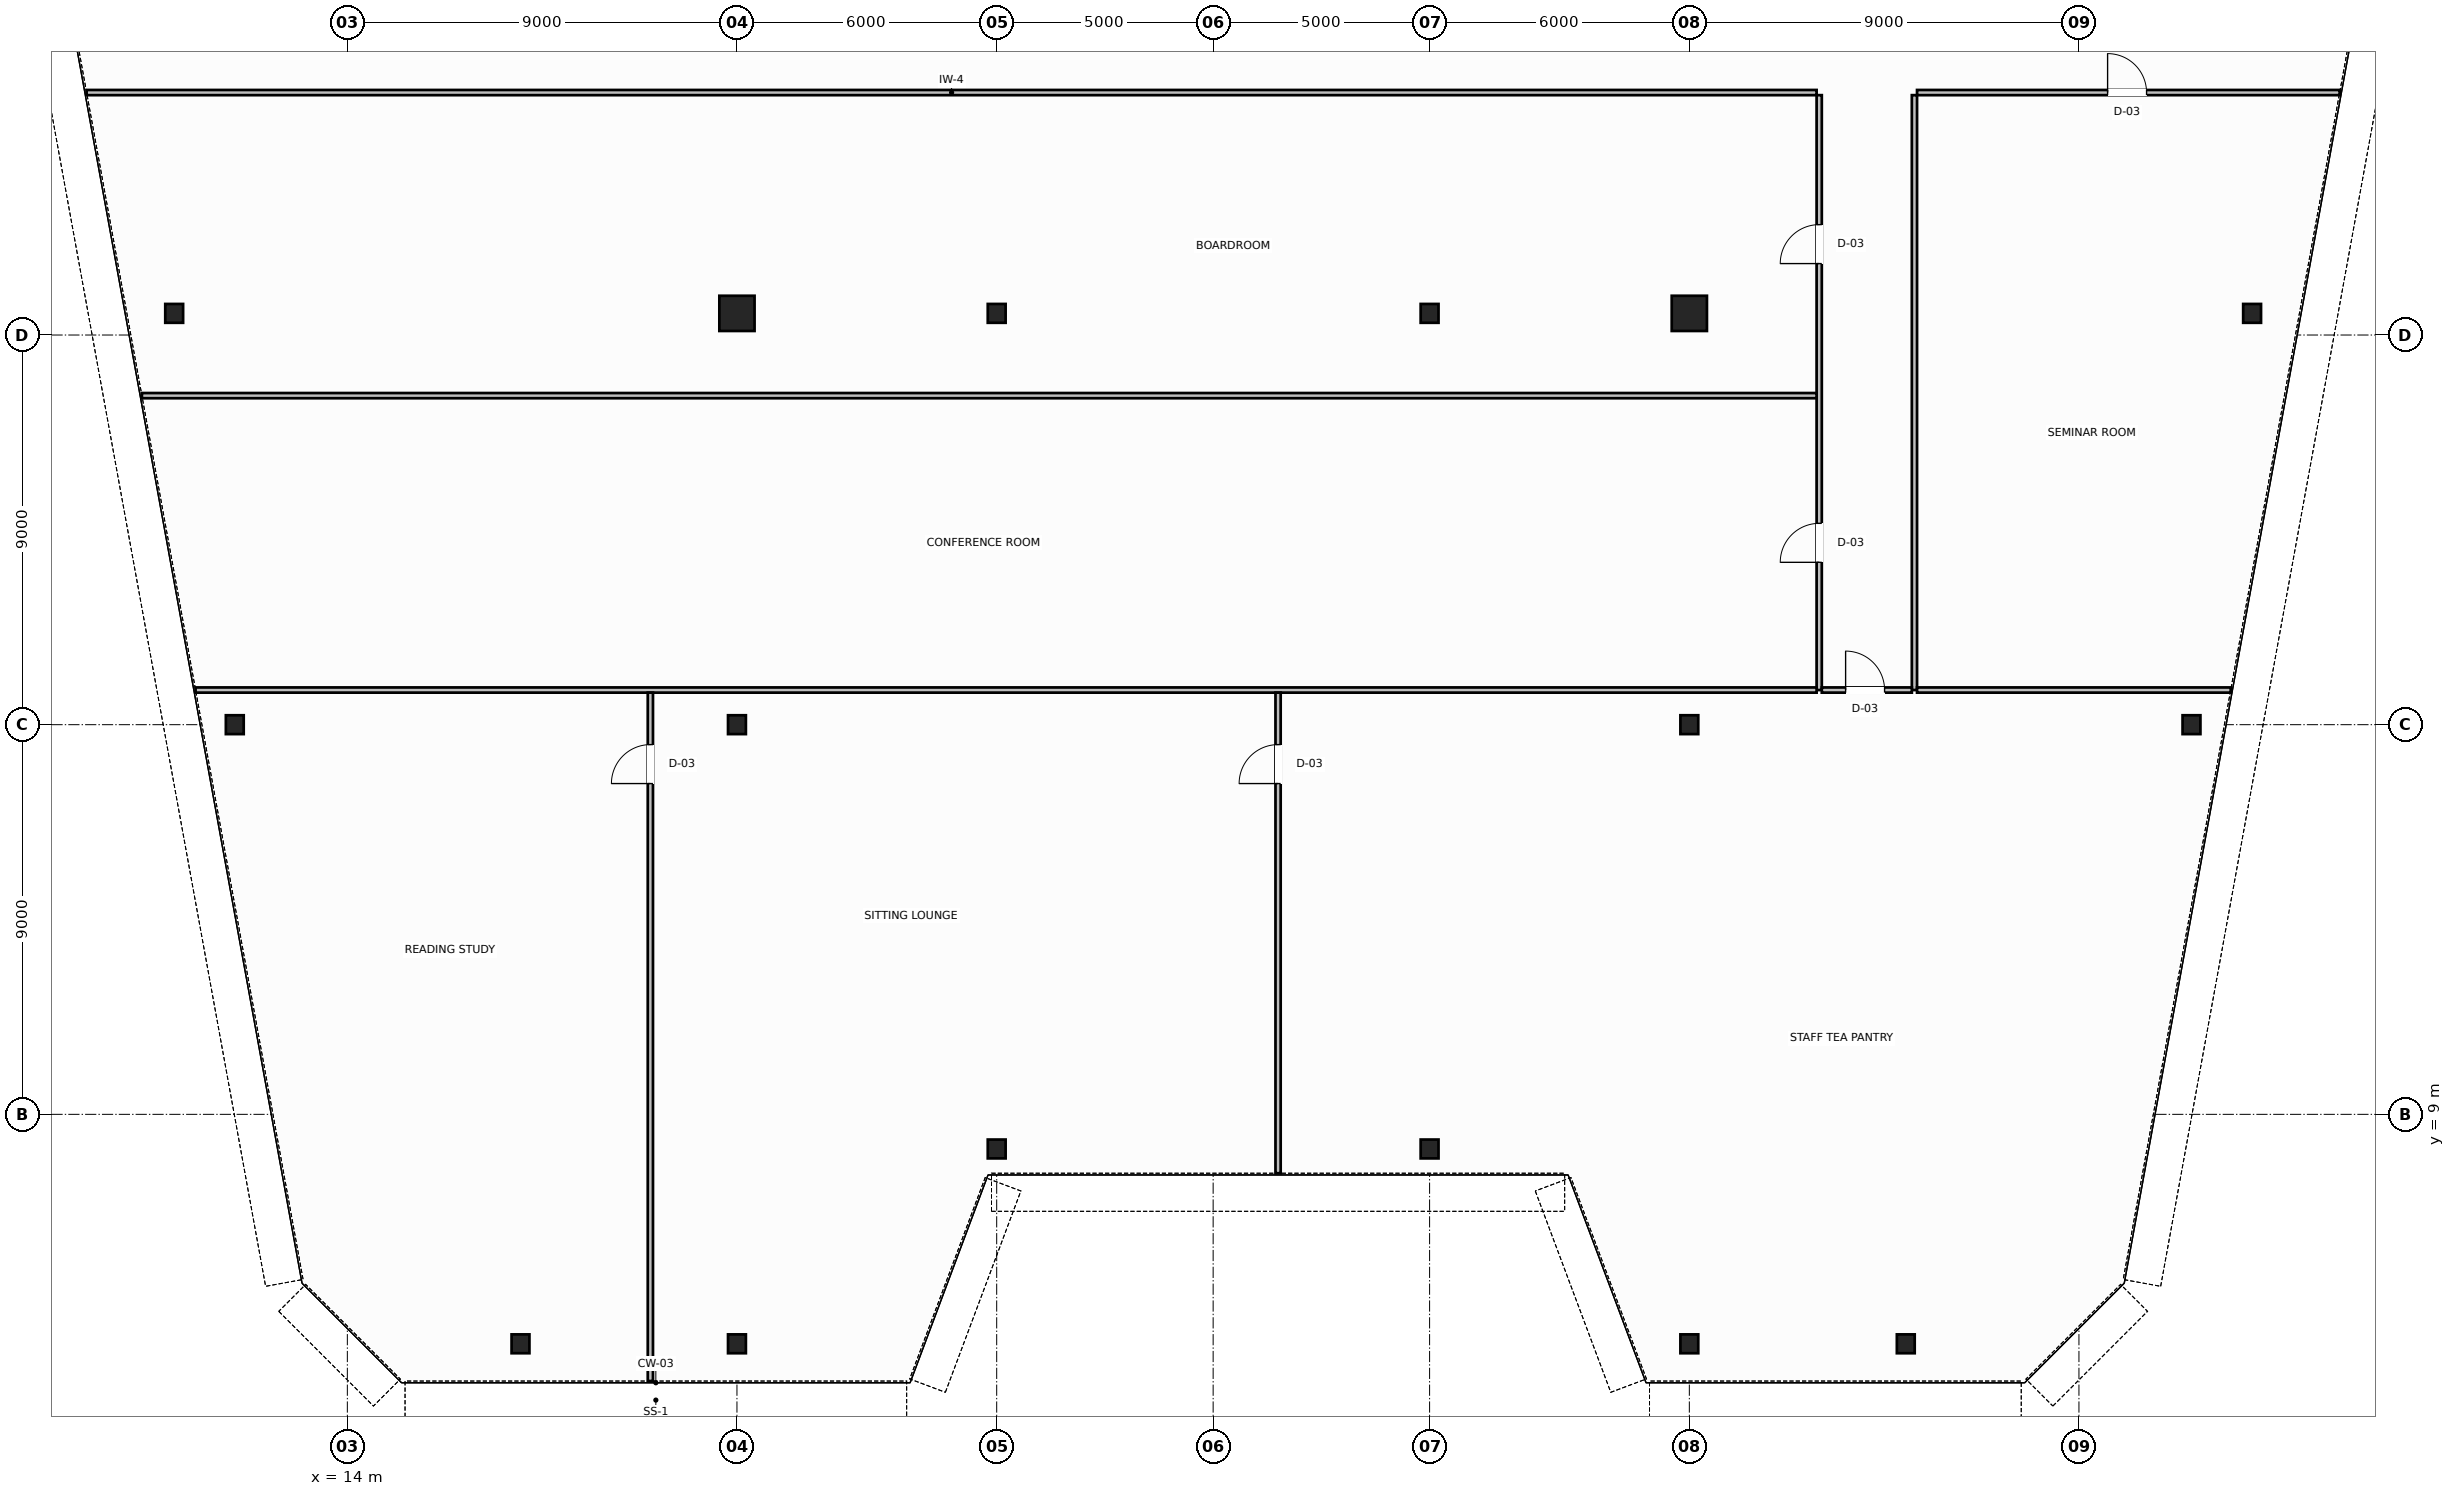
"""IFC4 building model, lengths in metres.
Left out: names, types, materials, properties, quantities, classifications, styles, units other than length and angle.
Written with IfcOpenShell. Run it as: python <this file> out.ifc"""

import sys

from ifc_helpers import new_model, si_unit, direction, frame, frame_2d, origin, origin_2d, place, context, subcontext, project, spatial, rectangle, hollow_circle, i_section, extrude, source, transform, mapped, element, fill, save


model = new_model("IFC4")
c1 = context("Model", 3, precision=1e-05, world=origin(), true_north=direction((0.0, 1.0)))
c2 = subcontext(c1, "Body", "Model", "MODEL_VIEW")
j1 = project(units=[si_unit("LENGTHUNIT", "METRE"), si_unit("PLANEANGLEUNIT", "RADIAN")], contexts=[c1])
p1 = place(None, origin())
s1 = spatial("IfcSite", under=j1, at=p1, CompositionType="ELEMENT")
p2 = place(p1, origin())
s2 = spatial("IfcBuilding", under=s1, at=p2, CompositionType="ELEMENT")
p3 = place(p2, frame((0.0, 0.0, 172.8)))
s3 = spatial("IfcBuildingStorey", under=s2, at=p3, CompositionType="ELEMENT", Elevation=172.8)
m1 = source(origin(), c2, "Body", "SweptSolid", [
    extrude(i_section(OverallWidth=0.412, OverallDepth=0.435, WebThickness=0.036, FlangeThickness=0.05, FilletRadius=0.015, at=origin_2d()), origin(), (0.0, 0.0, 1.0), 3.8),
])
for number, where, z_axis, x_axis in (
    (1, (10.0, 27.5, 0.0), (0.0, 0.0, 1.0), (1.0, 0.0, 0.0)),
    (2, (11.4, 18.0, 0.0), (0.0, 0.0, 1.0), (1.0, 0.0, 0.0)),
    (3, (58.0, 27.5, 0.0), (0.0, 0.0, 1.0), (1.0, 0.0, 0.0)),
    (4, (56.6, 18.0, 0.0), (0.0, 0.0, 1.0), (1.0, 0.0, 0.0)),
):
    element("IfcColumn", number, at=place(p3, frame(where, z_axis=z_axis, x_axis=x_axis)), inside=s3, PredefinedType="COLUMN", context=c2, shape_type="MappedRepresentation", body=[
        mapped(m1, transform((0.0, 0.0, 0.0), scale=1.0)),
    ])
m2 = source(origin(), c2, "Body", "SweptSolid", [
    extrude(hollow_circle(Radius=0.406, WallThickness=0.04, at=origin_2d()), origin(), (0.0, 0.0, 1.0), 3.8),
])
p4 = place(p3, frame((23.0, 27.5, 0.0), z_axis=(0.0, 0.0, 1.0), x_axis=(1.0, 0.0, 0.0)))
e5 = element("IfcColumn", 5, at=p4, inside=s3, PredefinedType="COLUMN", context=c2, shape_type="MappedRepresentation", body=[
    mapped(m2, transform((0.0, 0.0, 0.0), scale=1.0)),
])
m3 = source(origin(), c2, "Body", "SweptSolid", [
    extrude(i_section(OverallWidth=0.412, OverallDepth=0.435, WebThickness=0.036, FlangeThickness=0.05, FilletRadius=0.015, at=origin_2d()), origin(), (0.0, 0.0, 1.0), 3.8),
])
for number, where, z_axis, x_axis in (
    (6, (29.0, 27.5, 0.0), (0.0, 0.0, 1.0), (1.0, 0.0, 0.0)),
    (7, (39.0, 27.5, 0.0), (0.0, 0.0, 1.0), (1.0, 0.0, 0.0)),
):
    element("IfcColumn", number, at=place(p3, frame(where, z_axis=z_axis, x_axis=x_axis)), inside=s3, PredefinedType="COLUMN", context=c2, shape_type="MappedRepresentation", body=[
        mapped(m3, transform((0.0, 0.0, 0.0), scale=1.0)),
    ])
p5 = place(p3, frame((45.0, 27.5, 0.0), z_axis=(0.0, 0.0, 1.0), x_axis=(1.0, 0.0, 0.0)))
e8 = element("IfcColumn", 8, at=p5, inside=s3, PredefinedType="COLUMN", context=c2, shape_type="MappedRepresentation", body=[
    mapped(m2, transform((0.0, 0.0, 0.0), scale=1.0)),
])
for number, where, z_axis, x_axis in (
    (9, (23.0, 18.0, 0.0), (0.0, 0.0, 1.0), (1.0, 0.0, 0.0)),
    (10, (45.0, 18.0, 0.0), (0.0, 0.0, 1.0), (1.0, 0.0, 0.0)),
    (11, (18.0, 3.7, 0.0), (0.0, 0.0, 1.0), (1.0, 0.0, 0.0)),
    (12, (23.0, 3.7, 0.0), (0.0, 0.0, 1.0), (1.0, 0.0, 0.0)),
    (13, (29.0, 8.2, 0.0), (0.0, 0.0, 1.0), (1.0, 0.0, 0.0)),
    (14, (39.0, 8.2, 0.0), (0.0, 0.0, 1.0), (1.0, 0.0, 0.0)),
    (15, (45.0, 3.7, 0.0), (0.0, 0.0, 1.0), (1.0, 0.0, 0.0)),
    (16, (50.0, 3.7, 0.0), (0.0, 0.0, 1.0), (1.0, 0.0, 0.0)),
):
    element("IfcColumn", number, at=place(p3, frame(where, z_axis=z_axis, x_axis=x_axis)), inside=s3, PredefinedType="COLUMN", context=c2, shape_type="MappedRepresentation", body=[
        mapped(m3, transform((0.0, 0.0, 0.0), scale=1.0)),
    ])
p6 = place(p3, frame((7.977, 32.6, 0.0), z_axis=(0.0, 0.0, 1.0), x_axis=(1.0, 0.0, 0.0)))
e17 = element("IfcWall", 17, at=p6, inside=s3, PredefinedType="PARTITIONING", context=c2, shape_type="SweptSolid", body=[
    extrude(rectangle(XDim=39.963, YDim=0.12, at=frame_2d((19.981, 0.0))), origin(), (0.0, 0.0, 1.0), 3.58),
])
p7 = place(p3, frame((50.26, 32.6, 0.0), z_axis=(0.0, 0.0, 1.0), x_axis=(1.0, 0.0, 0.0)))
e18 = element("IfcWall", 18, at=p7, inside=s3, PredefinedType="PARTITIONING", context=c2, shape_type="SweptSolid", body=[
    extrude(rectangle(XDim=9.763, YDim=0.12, at=frame_2d((4.882, 0.0))), origin(), (0.0, 0.0, 1.0), 3.58),
])
p8 = place(p7, frame((4.402, 0.0, 0.0)))
e19 = element("IfcOpeningElement", 19, at=p8, cuts=e18, PredefinedType="OPENING", context=c2, shape_type="SweptSolid", body=[
    extrude(rectangle(XDim=0.9, YDim=2.15, at=frame_2d((0.45, 1.075))), frame((0.0, 0.07, 0.0), z_axis=(0.0, -1.0, 0.0), x_axis=(1.0, 0.0, 0.0)), (0.0, 0.0, 1.0), 0.14),
])
p9 = place(p3, frame((48.0, 18.8, 0.0), z_axis=(0.0, 0.0, 1.0), x_axis=(0.0, 1.0, 0.0)))
e20 = element("IfcWall", 20, at=p9, inside=s3, PredefinedType="PARTITIONING", context=c2, shape_type="SweptSolid", body=[
    extrude(rectangle(XDim=13.74, YDim=0.12, at=frame_2d((6.87, 0.0))), origin(), (0.0, 0.0, 1.0), 3.58),
])
p10 = place(p9, frame((2.95, 0.0, 0.0)))
e21 = element("IfcOpeningElement", 21, at=p10, cuts=e20, PredefinedType="OPENING", context=c2, shape_type="SweptSolid", body=[
    extrude(rectangle(XDim=0.9, YDim=2.15, at=frame_2d((0.45, 1.075))), frame((0.0, 0.07, 0.0), z_axis=(0.0, -1.0, 0.0), x_axis=(1.0, 0.0, 0.0)), (0.0, 0.0, 1.0), 0.14),
])
p11 = place(p9, frame((9.85, 0.0, 0.0)))
e22 = element("IfcOpeningElement", 22, at=p11, cuts=e20, PredefinedType="OPENING", context=c2, shape_type="SweptSolid", body=[
    extrude(rectangle(XDim=0.9, YDim=2.15, at=frame_2d((0.45, 1.075))), frame((0.0, 0.07, 0.0), z_axis=(0.0, -1.0, 0.0), x_axis=(1.0, 0.0, 0.0)), (0.0, 0.0, 1.0), 0.14),
])
p12 = place(p3, frame((50.2, 18.8, 0.0), z_axis=(0.0, 0.0, 1.0), x_axis=(0.0, 1.0, 0.0)))
e23 = element("IfcWall", 23, at=p12, inside=s3, PredefinedType="PARTITIONING", context=c2, shape_type="SweptSolid", body=[
    extrude(rectangle(XDim=13.74, YDim=0.12, at=frame_2d((6.87, 0.0))), origin(), (0.0, 0.0, 1.0), 3.58),
])
p13 = place(p3, frame((48.06, 18.8, 0.0), z_axis=(0.0, 0.0, 1.0), x_axis=(1.0, 0.0, 0.0)))
e24 = element("IfcWall", 24, at=p13, inside=s3, PredefinedType="PARTITIONING", context=c2, shape_type="SweptSolid", body=[
    extrude(rectangle(XDim=2.08, YDim=0.12, at=frame_2d((1.04, 0.0))), origin(), (0.0, 0.0, 1.0), 3.58),
])
p14 = place(p13, frame((0.55, 0.0, 0.0)))
e25 = element("IfcOpeningElement", 25, at=p14, cuts=e24, PredefinedType="OPENING", context=c2, shape_type="SweptSolid", body=[
    extrude(rectangle(XDim=0.9, YDim=2.15, at=frame_2d((0.45, 1.075))), frame((0.0, 0.07, 0.0), z_axis=(0.0, -1.0, 0.0), x_axis=(1.0, 0.0, 0.0)), (0.0, 0.0, 1.0), 0.14),
])
p15 = place(p3, frame((10.494, 18.8, 0.0), z_axis=(0.0, 0.0, 1.0), x_axis=(1.0, 0.0, 0.0)))
e26 = element("IfcWall", 26, at=p15, inside=s3, PredefinedType="PARTITIONING", context=c2, shape_type="SweptSolid", body=[
    extrude(rectangle(XDim=37.446, YDim=0.12, at=frame_2d((18.723, 0.0))), origin(), (0.0, 0.0, 1.0), 3.58),
])
p16 = place(p3, frame((50.26, 18.8, 0.0), z_axis=(0.0, 0.0, 1.0), x_axis=(1.0, 0.0, 0.0)))
e27 = element("IfcWall", 27, at=p16, inside=s3, PredefinedType="PARTITIONING", context=c2, shape_type="SweptSolid", body=[
    extrude(rectangle(XDim=7.246, YDim=0.12, at=frame_2d((3.623, 0.0))), origin(), (0.0, 0.0, 1.0), 3.58),
])
p17 = place(p3, frame((21.0, 2.84, 0.0), z_axis=(0.0, 0.0, 1.0), x_axis=(0.0, 1.0, 0.0)))
e28 = element("IfcWall", 28, at=p17, inside=s3, PredefinedType="PARTITIONING", context=c2, shape_type="SweptSolid", body=[
    extrude(rectangle(XDim=15.9, YDim=0.12, at=frame_2d((7.95, 0.0))), origin(), (0.0, 0.0, 1.0), 3.58),
])
p18 = place(p17, frame((13.8, 0.0, 0.0)))
e29 = element("IfcOpeningElement", 29, at=p18, cuts=e28, PredefinedType="OPENING", context=c2, shape_type="SweptSolid", body=[
    extrude(rectangle(XDim=0.9, YDim=2.15, at=frame_2d((0.45, 1.075))), frame((0.0, 0.07, 0.0), z_axis=(0.0, -1.0, 0.0), x_axis=(1.0, 0.0, 0.0)), (0.0, 0.0, 1.0), 0.14),
])
p19 = place(p3, frame((35.5, 7.64, 0.0), z_axis=(0.0, 0.0, 1.0), x_axis=(0.0, 1.0, 0.0)))
e30 = element("IfcWall", 30, at=p19, inside=s3, PredefinedType="PARTITIONING", context=c2, shape_type="SweptSolid", body=[
    extrude(rectangle(XDim=11.1, YDim=0.12, at=frame_2d((5.55, 0.0))), origin(), (0.0, 0.0, 1.0), 3.58),
])
p20 = place(p19, frame((9.0, 0.0, 0.0)))
e31 = element("IfcOpeningElement", 31, at=p20, cuts=e30, PredefinedType="OPENING", context=c2, shape_type="SweptSolid", body=[
    extrude(rectangle(XDim=0.9, YDim=2.15, at=frame_2d((0.45, 1.075))), frame((0.0, 0.07, 0.0), z_axis=(0.0, -1.0, 0.0), x_axis=(1.0, 0.0, 0.0)), (0.0, 0.0, 1.0), 0.14),
])
p21 = place(p3, frame((9.254, 25.6, 0.0), z_axis=(0.0, 0.0, 1.0), x_axis=(1.0, 0.0, 0.0)))
e32 = element("IfcWall", 32, at=p21, inside=s3, PredefinedType="PARTITIONING", context=c2, shape_type="SweptSolid", body=[
    extrude(rectangle(XDim=38.686, YDim=0.12, at=frame_2d((19.343, 0.0))), origin(), (0.0, 0.0, 1.0), 3.58),
])
m4 = source(origin(), c2, "Body", "SweptSolid", [
    extrude(rectangle(XDim=0.9, YDim=2.15, at=frame_2d((0.45, 1.075))), frame((0.0, 0.025, 0.0), z_axis=(0.0, -1.0, 0.0), x_axis=(1.0, 0.0, 0.0)), (0.0, 0.0, 1.0), 0.05),
])
p22 = place(p18, origin())
e33 = element("IfcDoor", 33, at=p22, inside=s3, OperationType="SINGLE_SWING_RIGHT", PredefinedType="DOOR", context=c2, shape_type="MappedRepresentation", body=[
    mapped(m4, transform((0.0, 0.0, 0.0), scale=1.0)),
])
fill(e29, e33)
p23 = place(p20, origin())
e34 = element("IfcDoor", 34, at=p23, inside=s3, OperationType="SINGLE_SWING_LEFT", PredefinedType="DOOR", context=c2, shape_type="MappedRepresentation", body=[
    mapped(m4, transform((0.0, 0.0, 0.0), scale=1.0)),
])
fill(e31, e34)
p24 = place(p14, origin())
e35 = element("IfcDoor", 35, at=p24, inside=s3, OperationType="SINGLE_SWING_LEFT", PredefinedType="DOOR", context=c2, shape_type="MappedRepresentation", body=[
    mapped(m4, transform((0.0, 0.0, 0.0), scale=1.0)),
])
fill(e25, e35)
p25 = place(p10, origin())
e36 = element("IfcDoor", 36, at=p25, inside=s3, OperationType="SINGLE_SWING_LEFT", PredefinedType="DOOR", context=c2, shape_type="MappedRepresentation", body=[
    mapped(m4, transform((0.0, 0.0, 0.0), scale=1.0)),
])
fill(e21, e36)
p26 = place(p11, origin())
e37 = element("IfcDoor", 37, at=p26, inside=s3, OperationType="SINGLE_SWING_RIGHT", PredefinedType="DOOR", context=c2, shape_type="MappedRepresentation", body=[
    mapped(m4, transform((0.0, 0.0, 0.0), scale=1.0)),
])
fill(e22, e37)
p27 = place(p8, origin())
e38 = element("IfcDoor", 38, at=p27, inside=s3, OperationType="SINGLE_SWING_RIGHT", PredefinedType="DOOR", context=c2, shape_type="MappedRepresentation", body=[
    mapped(m4, transform((0.0, 0.0, 0.0), scale=1.0)),
])
fill(e19, e38)
save(model, sys.argv[1])
